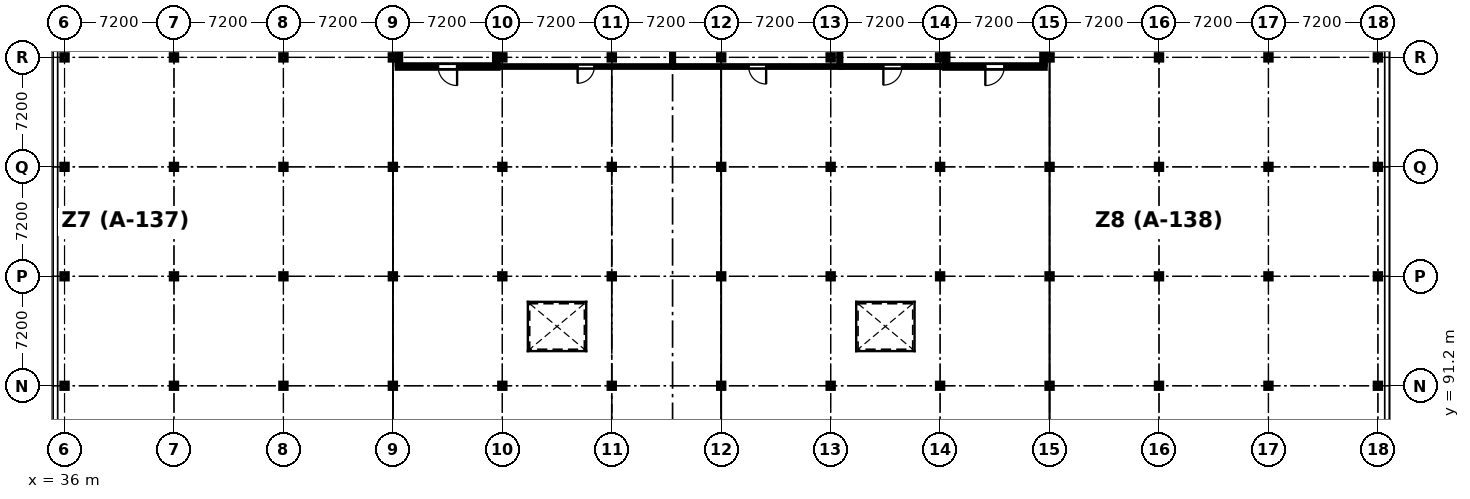
"""IFC4 building model, lengths in metres.
Left out: names, types, materials, properties, quantities, classifications, styles, units other than length and angle.
Written with IfcOpenShell. Run it as: python <this file> out.ifc"""

import sys

from ifc_helpers import new_model, si_unit, direction, frame, frame_2d, origin, origin_2d, place, context, subcontext, project, spatial, rectangle, i_section, extrude, element, fill, save


model = new_model("IFC4")
c1 = context("Model", 3, precision=1e-05, world=origin(), true_north=direction((0.0, 1.0)))
c2 = subcontext(c1, "Body", "Model", "MODEL_VIEW")
j1 = project(units=[si_unit("LENGTHUNIT", "METRE"), si_unit("PLANEANGLEUNIT", "RADIAN")], contexts=[c1])
p1 = place(None, origin())
s1 = spatial("IfcSite", under=j1, at=p1, CompositionType="ELEMENT")
p2 = place(p1, origin())
s2 = spatial("IfcBuilding", under=s1, at=p2, CompositionType="ELEMENT")
p3 = place(p2, frame((0.0, 0.0, 13.2)))
s3 = spatial("IfcBuildingStorey", under=s2, at=p3, CompositionType="ELEMENT", Elevation=13.2)
for number, where, z_axis, x_axis in (
    (1, (36.0, 91.2, 0.0), (0.0, 0.0, 1.0), (1.0, 0.0, 0.0)),
    (2, (36.0, 98.4, 0.0), (0.0, 0.0, 1.0), (1.0, 0.0, 0.0)),
    (3, (36.0, 105.6, 0.0), (0.0, 0.0, 1.0), (1.0, 0.0, 0.0)),
):
    element("IfcColumn", number, at=place(p3, frame(where, z_axis=z_axis, x_axis=x_axis)), inside=s3, PredefinedType="COLUMN", context=c2, shape_type="SweptSolid", body=[
        extrude(i_section(OverallWidth=0.371, OverallDepth=0.363, WebThickness=0.013, FlangeThickness=0.022, FilletRadius=0.015, at=origin_2d()), origin(), (0.0, 0.0, 1.0), 3.9),
    ])
p4 = place(p3, frame((36.0, 112.8, 0.0), z_axis=(0.0, 0.0, 1.0), x_axis=(1.0, 0.0, 0.0)))
e4 = element("IfcColumn", 4, at=p4, inside=s3, PredefinedType="COLUMN", context=c2, shape_type="SweptSolid", body=[
    extrude(i_section(OverallWidth=0.373, OverallDepth=0.373, WebThickness=0.016, FlangeThickness=0.026, FilletRadius=0.015, at=origin_2d()), origin(), (0.0, 0.0, 1.0), 3.9),
])
for number, where, z_axis, x_axis in (
    (5, (43.2, 91.2, 0.0), (0.0, 0.0, 1.0), (1.0, 0.0, 0.0)),
    (6, (43.2, 98.4, 0.0), (0.0, 0.0, 1.0), (1.0, 0.0, 0.0)),
    (7, (43.2, 105.6, 0.0), (0.0, 0.0, 1.0), (1.0, 0.0, 0.0)),
):
    element("IfcColumn", number, at=place(p3, frame(where, z_axis=z_axis, x_axis=x_axis)), inside=s3, PredefinedType="COLUMN", context=c2, shape_type="SweptSolid", body=[
        extrude(i_section(OverallWidth=0.371, OverallDepth=0.363, WebThickness=0.013, FlangeThickness=0.022, FilletRadius=0.015, at=origin_2d()), origin(), (0.0, 0.0, 1.0), 3.9),
    ])
p5 = place(p3, frame((43.2, 112.8, 0.0), z_axis=(0.0, 0.0, 1.0), x_axis=(1.0, 0.0, 0.0)))
e8 = element("IfcColumn", 8, at=p5, inside=s3, PredefinedType="COLUMN", context=c2, shape_type="SweptSolid", body=[
    extrude(i_section(OverallWidth=0.373, OverallDepth=0.373, WebThickness=0.016, FlangeThickness=0.026, FilletRadius=0.015, at=origin_2d()), origin(), (0.0, 0.0, 1.0), 3.9),
])
for number, where, z_axis, x_axis in (
    (9, (50.4, 91.2, 0.0), (0.0, 0.0, 1.0), (1.0, 0.0, 0.0)),
    (10, (50.4, 98.4, 0.0), (0.0, 0.0, 1.0), (1.0, 0.0, 0.0)),
    (11, (50.4, 105.6, 0.0), (0.0, 0.0, 1.0), (1.0, 0.0, 0.0)),
):
    element("IfcColumn", number, at=place(p3, frame(where, z_axis=z_axis, x_axis=x_axis)), inside=s3, PredefinedType="COLUMN", context=c2, shape_type="SweptSolid", body=[
        extrude(i_section(OverallWidth=0.371, OverallDepth=0.363, WebThickness=0.013, FlangeThickness=0.022, FilletRadius=0.015, at=origin_2d()), origin(), (0.0, 0.0, 1.0), 3.9),
    ])
p6 = place(p3, frame((50.4, 112.8, 0.0), z_axis=(0.0, 0.0, 1.0), x_axis=(1.0, 0.0, 0.0)))
e12 = element("IfcColumn", 12, at=p6, inside=s3, PredefinedType="COLUMN", context=c2, shape_type="SweptSolid", body=[
    extrude(i_section(OverallWidth=0.373, OverallDepth=0.373, WebThickness=0.016, FlangeThickness=0.026, FilletRadius=0.015, at=origin_2d()), origin(), (0.0, 0.0, 1.0), 3.9),
])
for number, where, z_axis, x_axis in (
    (13, (57.6, 91.2, 0.0), (0.0, 0.0, 1.0), (1.0, 0.0, 0.0)),
    (14, (57.6, 98.4, 0.0), (0.0, 0.0, 1.0), (1.0, 0.0, 0.0)),
    (15, (57.6, 105.6, 0.0), (0.0, 0.0, 1.0), (1.0, 0.0, 0.0)),
):
    element("IfcColumn", number, at=place(p3, frame(where, z_axis=z_axis, x_axis=x_axis)), inside=s3, PredefinedType="COLUMN", context=c2, shape_type="SweptSolid", body=[
        extrude(i_section(OverallWidth=0.371, OverallDepth=0.363, WebThickness=0.013, FlangeThickness=0.022, FilletRadius=0.015, at=origin_2d()), origin(), (0.0, 0.0, 1.0), 3.9),
    ])
p7 = place(p3, frame((57.6, 112.8, 0.0), z_axis=(0.0, 0.0, 1.0), x_axis=(1.0, 0.0, 0.0)))
e16 = element("IfcColumn", 16, at=p7, inside=s3, PredefinedType="COLUMN", context=c2, shape_type="SweptSolid", body=[
    extrude(i_section(OverallWidth=0.373, OverallDepth=0.373, WebThickness=0.016, FlangeThickness=0.026, FilletRadius=0.015, at=origin_2d()), origin(), (0.0, 0.0, 1.0), 3.9),
])
for number, where, z_axis, x_axis in (
    (17, (64.8, 91.2, 0.0), (0.0, 0.0, 1.0), (1.0, 0.0, 0.0)),
    (18, (64.8, 98.4, 0.0), (0.0, 0.0, 1.0), (1.0, 0.0, 0.0)),
    (19, (64.8, 105.6, 0.0), (0.0, 0.0, 1.0), (1.0, 0.0, 0.0)),
):
    element("IfcColumn", number, at=place(p3, frame(where, z_axis=z_axis, x_axis=x_axis)), inside=s3, PredefinedType="COLUMN", context=c2, shape_type="SweptSolid", body=[
        extrude(i_section(OverallWidth=0.371, OverallDepth=0.363, WebThickness=0.013, FlangeThickness=0.022, FilletRadius=0.015, at=origin_2d()), origin(), (0.0, 0.0, 1.0), 3.9),
    ])
p8 = place(p3, frame((64.8, 112.8, 0.0), z_axis=(0.0, 0.0, 1.0), x_axis=(1.0, 0.0, 0.0)))
e20 = element("IfcColumn", 20, at=p8, inside=s3, PredefinedType="COLUMN", context=c2, shape_type="SweptSolid", body=[
    extrude(i_section(OverallWidth=0.373, OverallDepth=0.373, WebThickness=0.016, FlangeThickness=0.026, FilletRadius=0.015, at=origin_2d()), origin(), (0.0, 0.0, 1.0), 3.9),
])
for number, where, z_axis, x_axis in (
    (21, (72.0, 91.2, 0.0), (0.0, 0.0, 1.0), (1.0, 0.0, 0.0)),
    (22, (72.0, 98.4, 0.0), (0.0, 0.0, 1.0), (1.0, 0.0, 0.0)),
    (23, (72.0, 105.6, 0.0), (0.0, 0.0, 1.0), (1.0, 0.0, 0.0)),
):
    element("IfcColumn", number, at=place(p3, frame(where, z_axis=z_axis, x_axis=x_axis)), inside=s3, PredefinedType="COLUMN", context=c2, shape_type="SweptSolid", body=[
        extrude(i_section(OverallWidth=0.371, OverallDepth=0.363, WebThickness=0.013, FlangeThickness=0.022, FilletRadius=0.015, at=origin_2d()), origin(), (0.0, 0.0, 1.0), 3.9),
    ])
p9 = place(p3, frame((72.0, 112.8, 0.0), z_axis=(0.0, 0.0, 1.0), x_axis=(1.0, 0.0, 0.0)))
e24 = element("IfcColumn", 24, at=p9, inside=s3, PredefinedType="COLUMN", context=c2, shape_type="SweptSolid", body=[
    extrude(i_section(OverallWidth=0.373, OverallDepth=0.373, WebThickness=0.016, FlangeThickness=0.026, FilletRadius=0.015, at=origin_2d()), origin(), (0.0, 0.0, 1.0), 3.9),
])
for number, where, z_axis, x_axis in (
    (25, (79.2, 91.2, 0.0), (0.0, 0.0, 1.0), (1.0, 0.0, 0.0)),
    (26, (79.2, 98.4, 0.0), (0.0, 0.0, 1.0), (1.0, 0.0, 0.0)),
    (27, (79.2, 105.6, 0.0), (0.0, 0.0, 1.0), (1.0, 0.0, 0.0)),
):
    element("IfcColumn", number, at=place(p3, frame(where, z_axis=z_axis, x_axis=x_axis)), inside=s3, PredefinedType="COLUMN", context=c2, shape_type="SweptSolid", body=[
        extrude(i_section(OverallWidth=0.371, OverallDepth=0.363, WebThickness=0.013, FlangeThickness=0.022, FilletRadius=0.015, at=origin_2d()), origin(), (0.0, 0.0, 1.0), 3.9),
    ])
p10 = place(p3, frame((79.2, 112.8, 0.0), z_axis=(0.0, 0.0, 1.0), x_axis=(1.0, 0.0, 0.0)))
e28 = element("IfcColumn", 28, at=p10, inside=s3, PredefinedType="COLUMN", context=c2, shape_type="SweptSolid", body=[
    extrude(i_section(OverallWidth=0.373, OverallDepth=0.373, WebThickness=0.016, FlangeThickness=0.026, FilletRadius=0.015, at=origin_2d()), origin(), (0.0, 0.0, 1.0), 3.9),
])
for number, where, z_axis, x_axis in (
    (29, (86.4, 91.2, 0.0), (0.0, 0.0, 1.0), (1.0, 0.0, 0.0)),
    (30, (86.4, 98.4, 0.0), (0.0, 0.0, 1.0), (1.0, 0.0, 0.0)),
    (31, (86.4, 105.6, 0.0), (0.0, 0.0, 1.0), (1.0, 0.0, 0.0)),
):
    element("IfcColumn", number, at=place(p3, frame(where, z_axis=z_axis, x_axis=x_axis)), inside=s3, PredefinedType="COLUMN", context=c2, shape_type="SweptSolid", body=[
        extrude(i_section(OverallWidth=0.371, OverallDepth=0.363, WebThickness=0.013, FlangeThickness=0.022, FilletRadius=0.015, at=origin_2d()), origin(), (0.0, 0.0, 1.0), 3.9),
    ])
p11 = place(p3, frame((86.4, 112.8, 0.0), z_axis=(0.0, 0.0, 1.0), x_axis=(1.0, 0.0, 0.0)))
e32 = element("IfcColumn", 32, at=p11, inside=s3, PredefinedType="COLUMN", context=c2, shape_type="SweptSolid", body=[
    extrude(i_section(OverallWidth=0.373, OverallDepth=0.373, WebThickness=0.016, FlangeThickness=0.026, FilletRadius=0.015, at=origin_2d()), origin(), (0.0, 0.0, 1.0), 3.9),
])
for number, where, z_axis, x_axis in (
    (33, (93.6, 91.2, 0.0), (0.0, 0.0, 1.0), (1.0, 0.0, 0.0)),
    (34, (93.6, 98.4, 0.0), (0.0, 0.0, 1.0), (1.0, 0.0, 0.0)),
    (35, (93.6, 105.6, 0.0), (0.0, 0.0, 1.0), (1.0, 0.0, 0.0)),
):
    element("IfcColumn", number, at=place(p3, frame(where, z_axis=z_axis, x_axis=x_axis)), inside=s3, PredefinedType="COLUMN", context=c2, shape_type="SweptSolid", body=[
        extrude(i_section(OverallWidth=0.371, OverallDepth=0.363, WebThickness=0.013, FlangeThickness=0.022, FilletRadius=0.015, at=origin_2d()), origin(), (0.0, 0.0, 1.0), 3.9),
    ])
p12 = place(p3, frame((93.6, 112.8, 0.0), z_axis=(0.0, 0.0, 1.0), x_axis=(1.0, 0.0, 0.0)))
e36 = element("IfcColumn", 36, at=p12, inside=s3, PredefinedType="COLUMN", context=c2, shape_type="SweptSolid", body=[
    extrude(i_section(OverallWidth=0.373, OverallDepth=0.373, WebThickness=0.016, FlangeThickness=0.026, FilletRadius=0.015, at=origin_2d()), origin(), (0.0, 0.0, 1.0), 3.9),
])
for number, where, z_axis, x_axis in (
    (37, (100.8, 91.2, 0.0), (0.0, 0.0, 1.0), (1.0, 0.0, 0.0)),
    (38, (100.8, 98.4, 0.0), (0.0, 0.0, 1.0), (1.0, 0.0, 0.0)),
    (39, (100.8, 105.6, 0.0), (0.0, 0.0, 1.0), (1.0, 0.0, 0.0)),
):
    element("IfcColumn", number, at=place(p3, frame(where, z_axis=z_axis, x_axis=x_axis)), inside=s3, PredefinedType="COLUMN", context=c2, shape_type="SweptSolid", body=[
        extrude(i_section(OverallWidth=0.371, OverallDepth=0.363, WebThickness=0.013, FlangeThickness=0.022, FilletRadius=0.015, at=origin_2d()), origin(), (0.0, 0.0, 1.0), 3.9),
    ])
p13 = place(p3, frame((100.8, 112.8, 0.0), z_axis=(0.0, 0.0, 1.0), x_axis=(1.0, 0.0, 0.0)))
e40 = element("IfcColumn", 40, at=p13, inside=s3, PredefinedType="COLUMN", context=c2, shape_type="SweptSolid", body=[
    extrude(i_section(OverallWidth=0.373, OverallDepth=0.373, WebThickness=0.016, FlangeThickness=0.026, FilletRadius=0.015, at=origin_2d()), origin(), (0.0, 0.0, 1.0), 3.9),
])
for number, where, z_axis, x_axis in (
    (41, (108.0, 91.2, 0.0), (0.0, 0.0, 1.0), (1.0, 0.0, 0.0)),
    (42, (108.0, 98.4, 0.0), (0.0, 0.0, 1.0), (1.0, 0.0, 0.0)),
    (43, (108.0, 105.6, 0.0), (0.0, 0.0, 1.0), (1.0, 0.0, 0.0)),
):
    element("IfcColumn", number, at=place(p3, frame(where, z_axis=z_axis, x_axis=x_axis)), inside=s3, PredefinedType="COLUMN", context=c2, shape_type="SweptSolid", body=[
        extrude(i_section(OverallWidth=0.371, OverallDepth=0.363, WebThickness=0.013, FlangeThickness=0.022, FilletRadius=0.015, at=origin_2d()), origin(), (0.0, 0.0, 1.0), 3.9),
    ])
p14 = place(p3, frame((108.0, 112.8, 0.0), z_axis=(0.0, 0.0, 1.0), x_axis=(1.0, 0.0, 0.0)))
e44 = element("IfcColumn", 44, at=p14, inside=s3, PredefinedType="COLUMN", context=c2, shape_type="SweptSolid", body=[
    extrude(i_section(OverallWidth=0.373, OverallDepth=0.373, WebThickness=0.016, FlangeThickness=0.026, FilletRadius=0.015, at=origin_2d()), origin(), (0.0, 0.0, 1.0), 3.9),
])
for number, where, z_axis, x_axis in (
    (45, (115.2, 91.2, 0.0), (0.0, 0.0, 1.0), (1.0, 0.0, 0.0)),
    (46, (115.2, 98.4, 0.0), (0.0, 0.0, 1.0), (1.0, 0.0, 0.0)),
    (47, (115.2, 105.6, 0.0), (0.0, 0.0, 1.0), (1.0, 0.0, 0.0)),
):
    element("IfcColumn", number, at=place(p3, frame(where, z_axis=z_axis, x_axis=x_axis)), inside=s3, PredefinedType="COLUMN", context=c2, shape_type="SweptSolid", body=[
        extrude(i_section(OverallWidth=0.371, OverallDepth=0.363, WebThickness=0.013, FlangeThickness=0.022, FilletRadius=0.015, at=origin_2d()), origin(), (0.0, 0.0, 1.0), 3.9),
    ])
p15 = place(p3, frame((115.2, 112.8, 0.0), z_axis=(0.0, 0.0, 1.0), x_axis=(1.0, 0.0, 0.0)))
e48 = element("IfcColumn", 48, at=p15, inside=s3, PredefinedType="COLUMN", context=c2, shape_type="SweptSolid", body=[
    extrude(i_section(OverallWidth=0.373, OverallDepth=0.373, WebThickness=0.016, FlangeThickness=0.026, FilletRadius=0.015, at=origin_2d()), origin(), (0.0, 0.0, 1.0), 3.9),
])
for number, where, z_axis, x_axis in (
    (49, (122.4, 91.2, 0.0), (0.0, 0.0, 1.0), (1.0, 0.0, 0.0)),
    (50, (122.4, 98.4, 0.0), (0.0, 0.0, 1.0), (1.0, 0.0, 0.0)),
    (51, (122.4, 105.6, 0.0), (0.0, 0.0, 1.0), (1.0, 0.0, 0.0)),
):
    element("IfcColumn", number, at=place(p3, frame(where, z_axis=z_axis, x_axis=x_axis)), inside=s3, PredefinedType="COLUMN", context=c2, shape_type="SweptSolid", body=[
        extrude(i_section(OverallWidth=0.371, OverallDepth=0.363, WebThickness=0.013, FlangeThickness=0.022, FilletRadius=0.015, at=origin_2d()), origin(), (0.0, 0.0, 1.0), 3.9),
    ])
p16 = place(p3, frame((122.4, 112.8, 0.0), z_axis=(0.0, 0.0, 1.0), x_axis=(1.0, 0.0, 0.0)))
e52 = element("IfcColumn", 52, at=p16, inside=s3, PredefinedType="COLUMN", context=c2, shape_type="SweptSolid", body=[
    extrude(i_section(OverallWidth=0.373, OverallDepth=0.373, WebThickness=0.016, FlangeThickness=0.026, FilletRadius=0.015, at=origin_2d()), origin(), (0.0, 0.0, 1.0), 3.9),
])
p17 = place(p3, frame((64.525, 112.2, 0.0), z_axis=(0.0, 0.0, 1.0), x_axis=(-1.0, 0.0, 0.0)))
e53 = element("IfcWall", 53, at=p17, inside=s3, PredefinedType="PARTITIONING", context=c2, shape_type="SweptSolid", body=[
    extrude(rectangle(XDim=6.65, YDim=0.25, at=frame_2d((3.325, 0.0))), origin(), (0.0, 0.0, 1.0), 3.028),
])
p18 = place(p17, frame((2.7, 0.0, 0.0)))
e54 = element("IfcOpeningElement", 54, at=p18, cuts=e53, PredefinedType="OPENING", context=c2, shape_type="SweptSolid", body=[
    extrude(rectangle(XDim=1.25, YDim=2.2, at=frame_2d((0.625, 1.1))), frame((0.0, 0.135, 0.0), z_axis=(0.0, -1.0, 0.0), x_axis=(1.0, 0.0, 0.0)), (0.0, 0.0, 1.0), 0.27),
])
for number, where, z_axis, x_axis in (
    (55, (58.0, 112.327, 0.0), (0.0, 0.0, 1.0), (0.0, 1.0, 0.0)),
    (56, (64.4, 115.998, 0.0), (0.0, 0.0, 1.0), (0.0, -1.0, 0.0)),
):
    element("IfcWall", number, at=place(p3, frame(where, z_axis=z_axis, x_axis=x_axis)), inside=s3, PredefinedType="PARTITIONING", context=c2, shape_type="SweptSolid", body=[
        extrude(rectangle(XDim=3.671, YDim=0.25, at=frame_2d((1.835, 0.0))), origin(), (0.0, 0.0, 1.0), 3.028),
    ])
p19 = place(p3, frame((100.525, 112.2, 0.0), z_axis=(0.0, 0.0, 1.0), x_axis=(-1.0, 0.0, 0.0)))
e57 = element("IfcWall", 57, at=p19, inside=s3, PredefinedType="PARTITIONING", context=c2, shape_type="SweptSolid", body=[
    extrude(rectangle(XDim=6.65, YDim=0.25, at=frame_2d((3.325, 0.0))), origin(), (0.0, 0.0, 1.0), 3.028),
])
p20 = place(p19, frame((2.7, 0.0, 0.0)))
e58 = element("IfcOpeningElement", 58, at=p20, cuts=e57, PredefinedType="OPENING", context=c2, shape_type="SweptSolid", body=[
    extrude(rectangle(XDim=1.25, YDim=2.2, at=frame_2d((0.625, 1.1))), frame((0.0, 0.135, 0.0), z_axis=(0.0, -1.0, 0.0), x_axis=(1.0, 0.0, 0.0)), (0.0, 0.0, 1.0), 0.27),
])
for number, where, z_axis, x_axis in (
    (59, (94.0, 112.327, 0.0), (0.0, 0.0, 1.0), (0.0, 1.0, 0.0)),
    (60, (100.4, 116.011, 0.0), (0.0, 0.0, 1.0), (0.0, -1.0, 0.0)),
):
    element("IfcWall", number, at=place(p3, frame(where, z_axis=z_axis, x_axis=x_axis)), inside=s3, PredefinedType="PARTITIONING", context=c2, shape_type="SweptSolid", body=[
        extrude(rectangle(XDim=3.684, YDim=0.25, at=frame_2d((1.842, 0.0))), origin(), (0.0, 0.0, 1.0), 3.028),
    ])
p21 = place(p3, frame((76.08, 112.2, 0.0), z_axis=(0.0, 0.0, 1.0), x_axis=(-1.0, 0.0, 0.0)))
e61 = element("IfcWall", 61, at=p21, inside=s3, PredefinedType="PARTITIONING", context=c2, shape_type="SweptSolid", body=[
    extrude(rectangle(XDim=11.553, YDim=0.125, at=frame_2d((5.776, 0.0))), origin(), (0.0, 0.0, 1.0), 3.028),
])
p22 = place(p21, frame((5.226, 0.0, 0.0)))
e62 = element("IfcOpeningElement", 62, at=p22, cuts=e61, PredefinedType="OPENING", context=c2, shape_type="SweptSolid", body=[
    extrude(rectangle(XDim=1.1, YDim=2.1, at=frame_2d((0.55, 1.05))), frame((0.0, 0.073, 0.0), z_axis=(0.0, -1.0, 0.0), x_axis=(1.0, 0.0, 0.0)), (0.0, 0.0, 1.0), 0.145),
])
p23 = place(p3, frame((87.08, 112.2, 0.0), z_axis=(0.0, 0.0, 1.0), x_axis=(-1.0, 0.0, 0.0)))
e63 = element("IfcWall", 63, at=p23, inside=s3, PredefinedType="PARTITIONING", context=c2, shape_type="SweptSolid", body=[
    extrude(rectangle(XDim=10.998, YDim=0.13, at=frame_2d((5.499, 0.0))), origin(), (0.0, 0.0, 1.0), 3.028),
])
p24 = place(p23, frame((4.924, 0.0, 0.0)))
e64 = element("IfcOpeningElement", 64, at=p24, cuts=e63, PredefinedType="OPENING", context=c2, shape_type="SweptSolid", body=[
    extrude(rectangle(XDim=1.15, YDim=2.1, at=frame_2d((0.575, 1.05))), frame((0.0, 0.075, 0.0), z_axis=(0.0, -1.0, 0.0), x_axis=(1.0, 0.0, 0.0)), (0.0, 0.0, 1.0), 0.15),
])
p25 = place(p23, frame((2.074, 0.0, 0.95)))
e65 = element("IfcOpeningElement", 65, at=p25, cuts=e63, PredefinedType="OPENING", context=c2, shape_type="SweptSolid", body=[
    extrude(rectangle(XDim=1.6, YDim=1.0, at=frame_2d((0.8, 0.5))), frame((0.0, 0.075, 0.0), z_axis=(0.0, -1.0, 0.0), x_axis=(1.0, 0.0, 0.0)), (0.0, 0.0, 1.0), 0.15),
])
p26 = place(p3, frame((93.873, 112.2, 0.0), z_axis=(0.0, 0.0, 1.0), x_axis=(-1.0, 0.0, 0.0)))
e66 = element("IfcWall", 66, at=p26, inside=s3, PredefinedType="PARTITIONING", context=c2, shape_type="SweptSolid", body=[
    extrude(rectangle(XDim=6.791, YDim=0.135, at=frame_2d((3.396, 0.0))), origin(), (0.0, 0.0, 1.0), 3.028),
])
p27 = place(p26, frame((2.786, 0.0, 0.0)))
e67 = element("IfcOpeningElement", 67, at=p27, cuts=e66, PredefinedType="OPENING", context=c2, shape_type="SweptSolid", body=[
    extrude(rectangle(XDim=1.22, YDim=2.1, at=frame_2d((0.61, 1.05))), frame((0.0, 0.077, 0.0), z_axis=(0.0, -1.0, 0.0), x_axis=(1.0, 0.0, 0.0)), (0.0, 0.0, 1.0), 0.155),
])
p28 = place(p3, frame((76.0, 116.05, 0.0), z_axis=(0.0, 0.0, 1.0), x_axis=(0.0, -1.0, 0.0)))
e68 = element("IfcWall", 68, at=p28, inside=s3, PredefinedType="PARTITIONING", context=c2, shape_type="SweptSolid", body=[
    extrude(rectangle(XDim=3.783, YDim=0.155, at=frame_2d((1.892, 0.0))), origin(), (0.0, 0.0, 1.0), 3.028),
])
p29 = place(p3, frame((87.0, 116.048, 0.0), z_axis=(0.0, 0.0, 1.0), x_axis=(0.0, -1.0, 0.0)))
e69 = element("IfcWall", 69, at=p29, inside=s3, PredefinedType="PARTITIONING", context=c2, shape_type="SweptSolid", body=[
    extrude(rectangle(XDim=3.778, YDim=0.16, at=frame_2d((1.889, 0.0))), origin(), (0.0, 0.0, 1.0), 3.028),
])
p30 = place(p18, origin())
e70 = element("IfcDoor", 70, at=p30, inside=s3, OperationType="SINGLE_SWING_LEFT", PredefinedType="DOOR", context=c2, shape_type="SweptSolid", body=[
    extrude(rectangle(XDim=1.25, YDim=2.2, at=frame_2d((0.625, 1.1))), frame((0.0, 0.025, 0.0), z_axis=(0.0, -1.0, 0.0), x_axis=(1.0, 0.0, 0.0)), (0.0, 0.0, 1.0), 0.05),
])
fill(e54, e70)
p31 = place(p20, origin())
e71 = element("IfcDoor", 71, at=p31, inside=s3, OperationType="SINGLE_SWING_RIGHT", PredefinedType="DOOR", context=c2, shape_type="SweptSolid", body=[
    extrude(rectangle(XDim=1.25, YDim=2.2, at=frame_2d((0.625, 1.1))), frame((0.0, 0.025, 0.0), z_axis=(0.0, -1.0, 0.0), x_axis=(1.0, 0.0, 0.0)), (0.0, 0.0, 1.0), 0.05),
])
fill(e58, e71)
p32 = place(p22, origin())
e72 = element("IfcDoor", 72, at=p32, inside=s3, OperationType="SINGLE_SWING_RIGHT", PredefinedType="DOOR", context=c2, shape_type="SweptSolid", body=[
    extrude(rectangle(XDim=1.1, YDim=2.1, at=frame_2d((0.55, 1.05))), frame((0.0, 0.025, 0.0), z_axis=(0.0, -1.0, 0.0), x_axis=(1.0, 0.0, 0.0)), (0.0, 0.0, 1.0), 0.05),
])
fill(e62, e72)
p33 = place(p24, origin())
e73 = element("IfcDoor", 73, at=p33, inside=s3, OperationType="SINGLE_SWING_LEFT", PredefinedType="DOOR", context=c2, shape_type="SweptSolid", body=[
    extrude(rectangle(XDim=1.15, YDim=2.1, at=frame_2d((0.575, 1.05))), frame((0.0, 0.025, 0.0), z_axis=(0.0, -1.0, 0.0), x_axis=(1.0, 0.0, 0.0)), (0.0, 0.0, 1.0), 0.05),
])
fill(e64, e73)
p34 = place(p25, origin())
e74 = element("IfcWindow", 74, at=p34, inside=s3, PartitioningType="SINGLE_PANEL", PredefinedType="WINDOW", context=c2, shape_type="SweptSolid", body=[
    extrude(rectangle(XDim=1.6, YDim=1.0, at=frame_2d((0.8, 0.5))), frame((0.0, 0.03, 0.0), z_axis=(0.0, -1.0, 0.0), x_axis=(1.0, 0.0, 0.0)), (0.0, 0.0, 1.0), 0.06),
])
fill(e65, e74)
p35 = place(p27, origin())
e75 = element("IfcDoor", 75, at=p35, inside=s3, OperationType="SINGLE_SWING_RIGHT", PredefinedType="DOOR", context=c2, shape_type="SweptSolid", body=[
    extrude(rectangle(XDim=1.22, YDim=2.1, at=frame_2d((0.61, 1.05))), frame((0.0, 0.025, 0.0), z_axis=(0.0, -1.0, 0.0), x_axis=(1.0, 0.0, 0.0)), (0.0, 0.0, 1.0), 0.05),
])
fill(e67, e75)
save(model, sys.argv[1])
